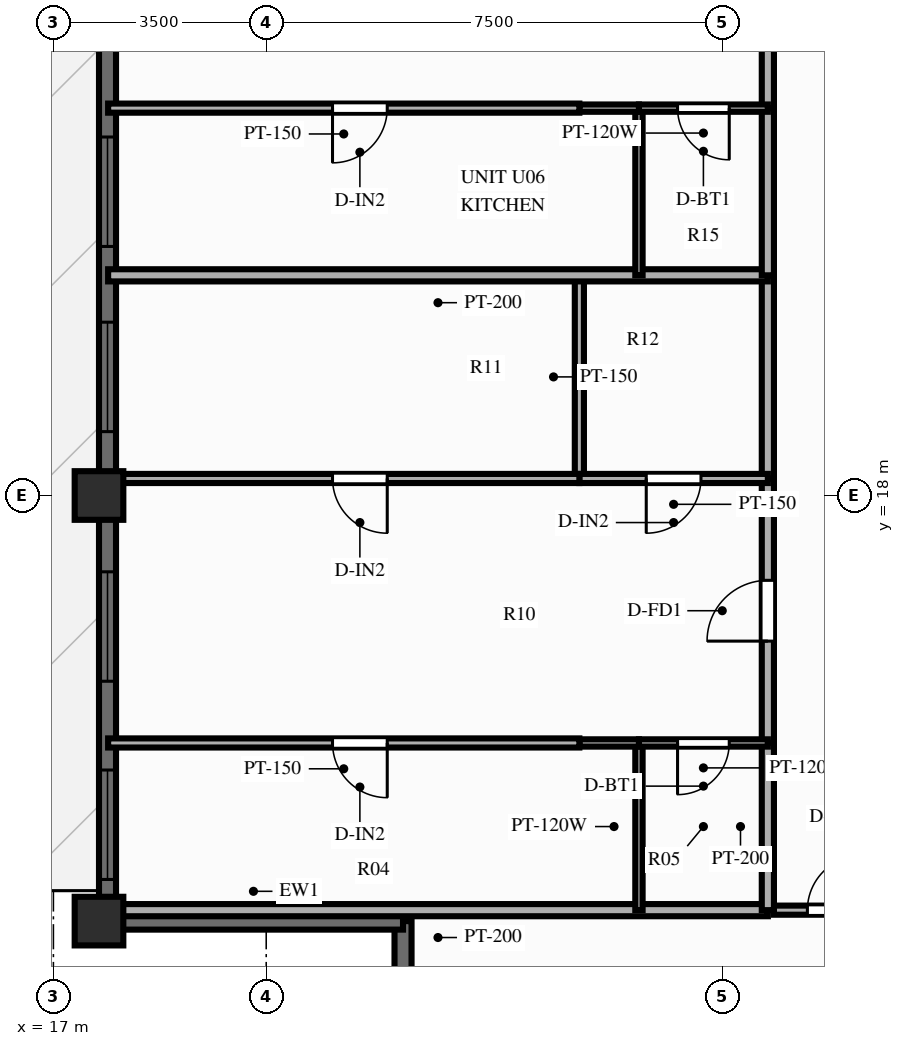
"""IFC4 building model, lengths in metres.
Left out: names, types, materials, properties, quantities, classifications, styles, units other than length and angle.
Written with IfcOpenShell. Run it as: python <this file> out.ifc"""

import sys

from ifc_helpers import new_model, si_unit, direction, frame, frame_2d, origin, origin_2d, place, context, subcontext, project, spatial, rectangle, extrude, source, transform, mapped, element, fill, save


model = new_model("IFC4")
c1 = context("Model", 3, precision=1e-05, world=origin(), true_north=direction((0.0, 1.0)))
c2 = subcontext(c1, "Body", "Model", "MODEL_VIEW")
j1 = project(units=[si_unit("LENGTHUNIT", "METRE"), si_unit("PLANEANGLEUNIT", "RADIAN")], contexts=[c1])
p1 = place(None, origin())
s1 = spatial("IfcSite", under=j1, at=p1, CompositionType="ELEMENT")
p2 = place(p1, origin())
s2 = spatial("IfcBuilding", under=s1, at=p2, CompositionType="ELEMENT")
p3 = place(p2, frame((0.0, 0.0, 172.9)))
s3 = spatial("IfcBuildingStorey", under=s2, at=p3, CompositionType="ELEMENT", Elevation=172.9)
m1 = source(origin(), c2, "Body", "SweptSolid", [
    extrude(rectangle(XDim=0.8, YDim=0.8, at=origin_2d()), origin(), (0.0, 0.0, 1.0), 3.9),
])
for number, where, z_axis, x_axis in (
    (1, (17.75, 18.0, 0.0), (0.0, 0.0, 1.0), (1.0, 0.0, 0.0)),
    (2, (17.75, 11.0, 0.0), (0.0, 0.0, 1.0), (1.0, 0.0, 0.0)),
):
    element("IfcColumn", number, at=place(p3, frame(where, z_axis=z_axis, x_axis=x_axis)), inside=s3, PredefinedType="COLUMN", context=c2, shape_type="MappedRepresentation", body=[
        mapped(m1, transform((0.0, 0.0, 0.0), scale=1.0)),
    ])
p4 = place(p3, frame((17.89, 11.0, 0.0), z_axis=(0.0, 0.0, 1.0), x_axis=(0.0, 1.0, 0.0)))
e3 = element("IfcWall", 3, at=p4, inside=s3, PredefinedType="SOLIDWALL", context=c2, shape_type="SweptSolid", body=[
    extrude(rectangle(XDim=32.0, YDim=0.28, at=frame_2d((16.0, 0.0))), origin(), (0.0, 0.0, 1.0), 2.79),
])
p5 = place(p4, frame((0.685, 0.0, 0.85)))
e4 = element("IfcOpeningElement", 4, at=p5, cuts=e3, PredefinedType="OPENING", context=c2, shape_type="SweptSolid", body=[
    extrude(rectangle(XDim=1.8, YDim=1.65, at=frame_2d((0.9, 0.825))), frame((0.0, 0.152, 0.0), z_axis=(0.0, -1.0, 0.0), x_axis=(1.0, 0.0, 0.0)), (0.0, 0.0, 1.0), 0.304),
])
p6 = place(p4, frame((3.945, 0.0, 0.85)))
e5 = element("IfcOpeningElement", 5, at=p6, cuts=e3, PredefinedType="OPENING", context=c2, shape_type="SweptSolid", body=[
    extrude(rectangle(XDim=1.8, YDim=1.65, at=frame_2d((0.9, 0.825))), frame((0.0, 0.152, 0.0), z_axis=(0.0, -1.0, 0.0), x_axis=(1.0, 0.0, 0.0)), (0.0, 0.0, 1.0), 0.304),
])
p7 = place(p4, frame((8.051, 0.0, 0.85)))
e6 = element("IfcOpeningElement", 6, at=p7, cuts=e3, PredefinedType="OPENING", context=c2, shape_type="SweptSolid", body=[
    extrude(rectangle(XDim=1.8, YDim=1.65, at=frame_2d((0.9, 0.825))), frame((0.0, 0.152, 0.0), z_axis=(0.0, -1.0, 0.0), x_axis=(1.0, 0.0, 0.0)), (0.0, 0.0, 1.0), 0.304),
])
p8 = place(p4, frame((11.096, 0.0, 0.85)))
e7 = element("IfcOpeningElement", 7, at=p8, cuts=e3, PredefinedType="OPENING", context=c2, shape_type="SweptSolid", body=[
    extrude(rectangle(XDim=1.8, YDim=1.65, at=frame_2d((0.9, 0.825))), frame((0.0, 0.152, 0.0), z_axis=(0.0, -1.0, 0.0), x_axis=(1.0, 0.0, 0.0)), (0.0, 0.0, 1.0), 0.304),
])
p9 = place(p4, frame((14.575, 0.0, 0.0)))
e8 = element("IfcOpeningElement", 8, at=p9, cuts=e3, PredefinedType="OPENING", context=c2, shape_type="SweptSolid", body=[
    extrude(rectangle(XDim=1.6, YDim=2.15, at=frame_2d((0.8, 1.075))), frame((0.0, 0.152, 0.0), z_axis=(0.0, -1.0, 0.0), x_axis=(1.0, 0.0, 0.0)), (0.0, 0.0, 1.0), 0.304),
])
p10 = place(p4, frame((18.479, 0.0, 0.85)))
e9 = element("IfcOpeningElement", 9, at=p10, cuts=e3, PredefinedType="OPENING", context=c2, shape_type="SweptSolid", body=[
    extrude(rectangle(XDim=1.8, YDim=1.65, at=frame_2d((0.9, 0.825))), frame((0.0, 0.152, 0.0), z_axis=(0.0, -1.0, 0.0), x_axis=(1.0, 0.0, 0.0)), (0.0, 0.0, 1.0), 0.304),
])
p11 = place(p4, frame((21.854, 0.0, 0.85)))
e10 = element("IfcOpeningElement", 10, at=p11, cuts=e3, PredefinedType="OPENING", context=c2, shape_type="SweptSolid", body=[
    extrude(rectangle(XDim=1.8, YDim=1.65, at=frame_2d((0.9, 0.825))), frame((0.0, 0.152, 0.0), z_axis=(0.0, -1.0, 0.0), x_axis=(1.0, 0.0, 0.0)), (0.0, 0.0, 1.0), 0.304),
])
p12 = place(p4, frame((25.796, 0.0, 0.85)))
e11 = element("IfcOpeningElement", 11, at=p12, cuts=e3, PredefinedType="OPENING", context=c2, shape_type="SweptSolid", body=[
    extrude(rectangle(XDim=1.5, YDim=1.65, at=frame_2d((0.75, 0.825))), frame((0.0, 0.152, 0.0), z_axis=(0.0, -1.0, 0.0), x_axis=(1.0, 0.0, 0.0)), (0.0, 0.0, 1.0), 0.304),
])
p13 = place(p4, frame((28.906, 0.0, 0.85)))
e12 = element("IfcOpeningElement", 12, at=p13, cuts=e3, PredefinedType="OPENING", context=c2, shape_type="SweptSolid", body=[
    extrude(rectangle(XDim=1.8, YDim=1.65, at=frame_2d((0.9, 0.825))), frame((0.0, 0.152, 0.0), z_axis=(0.0, -1.0, 0.0), x_axis=(1.0, 0.0, 0.0)), (0.0, 0.0, 1.0), 0.304),
])
for number, where, z_axis, x_axis in (
    (13, (22.75, 6.08, 0.0), (0.0, 0.0, 1.0), (0.0, 1.0, 0.0)),
    (14, (17.83, 11.0, 0.0), (0.0, 0.0, 1.0), (1.0, 0.0, 0.0)),
):
    element("IfcWall", number, at=place(p3, frame(where, z_axis=z_axis, x_axis=x_axis)), inside=s3, PredefinedType="SOLIDWALL", context=c2, shape_type="SweptSolid", body=[
        extrude(rectangle(XDim=4.92, YDim=0.28, at=frame_2d((2.46, 0.0))), origin(), (0.0, 0.0, 1.0), 2.79),
    ])
p14 = place(p3, frame((28.85, 11.18, 0.0), z_axis=(0.0, 0.0, 1.0), x_axis=(1.0, 0.0, 0.0)))
e15 = element("IfcWall", 15, at=p14, inside=s3, PredefinedType="PARTITIONING", context=c2, shape_type="SweptSolid", body=[
    extrude(rectangle(XDim=2.33, YDim=0.15, at=frame_2d((1.165, 0.0))), origin(), (0.0, 0.0, 1.0), 3.69),
])
p15 = place(p14, frame((0.55, 0.0, 0.0)))
e16 = element("IfcOpeningElement", 16, at=p15, cuts=e15, PredefinedType="OPENING", context=c2, shape_type="SweptSolid", body=[
    extrude(rectangle(XDim=0.9, YDim=2.1, at=frame_2d((0.45, 1.05))), frame((0.0, 0.087, 0.0), z_axis=(0.0, -1.0, 0.0), x_axis=(1.0, 0.0, 0.0)), (0.0, 0.0, 1.0), 0.174),
])
p16 = place(p3, frame((28.75, 11.18, 0.0), z_axis=(0.0, 0.0, 1.0), x_axis=(-1.0, 0.0, 0.0)))
e17 = element("IfcWall", 17, at=p16, inside=s3, PredefinedType="PARTITIONING", context=c2, shape_type="SweptSolid", body=[
    extrude(rectangle(XDim=10.85, YDim=0.2, at=frame_2d((5.425, 0.0))), origin(), (0.0, 0.0, 1.0), 3.69),
])
p17 = place(p3, frame((28.75, 11.18, 0.0), z_axis=(0.0, 0.0, 1.0), x_axis=(0.0, 1.0, 0.0)))
e18 = element("IfcWall", 18, at=p17, inside=s3, PredefinedType="PARTITIONING", context=c2, shape_type="SweptSolid", body=[
    extrude(rectangle(XDim=2.75, YDim=0.2, at=frame_2d((1.375, 0.0))), origin(), (0.0, 0.0, 1.0), 3.69),
])
p18 = place(p3, frame((28.75, 13.93, 0.0), z_axis=(0.0, 0.0, 1.0), x_axis=(0.0, 1.0, 0.0)))
e19 = element("IfcWall", 19, at=p18, inside=s3, PredefinedType="PARTITIONING", context=c2, shape_type="SweptSolid", body=[
    extrude(rectangle(XDim=4.35, YDim=0.2, at=frame_2d((2.175, 0.0))), origin(), (0.0, 0.0, 1.0), 3.69),
])
p19 = place(p18, frame((1.675, 0.0, 0.0)))
e20 = element("IfcOpeningElement", 20, at=p19, cuts=e19, PredefinedType="OPENING", context=c2, shape_type="SweptSolid", body=[
    extrude(rectangle(XDim=1.0, YDim=2.15, at=frame_2d((0.5, 1.075))), frame((0.0, 0.112, 0.0), z_axis=(0.0, -1.0, 0.0), x_axis=(1.0, 0.0, 0.0)), (0.0, 0.0, 1.0), 0.224),
])
p20 = place(p3, frame((28.75, 18.28, 0.0), z_axis=(0.0, 0.0, 1.0), x_axis=(0.0, 1.0, 0.0)))
e21 = element("IfcWall", 21, at=p20, inside=s3, PredefinedType="PARTITIONING", context=c2, shape_type="SweptSolid", body=[
    extrude(rectangle(XDim=3.341, YDim=0.2, at=frame_2d((1.67, 0.0))), origin(), (0.0, 0.0, 1.0), 3.69),
])
p21 = place(p3, frame((26.63, 11.18, 0.0), z_axis=(0.0, 0.0, 1.0), x_axis=(0.0, 1.0, 0.0)))
e22 = element("IfcWall", 22, at=p21, inside=s3, PredefinedType="PARTITIONING", context=c2, shape_type="SweptSolid", body=[
    extrude(rectangle(XDim=2.75, YDim=0.12, at=frame_2d((1.375, 0.0))), origin(), (0.0, 0.0, 1.0), 3.69),
])
p22 = place(p3, frame((25.65, 18.28, 0.0), z_axis=(0.0, 0.0, 1.0), x_axis=(0.0, 1.0, 0.0)))
e23 = element("IfcWall", 23, at=p22, inside=s3, PredefinedType="PARTITIONING", context=c2, shape_type="SweptSolid", body=[
    extrude(rectangle(XDim=3.341, YDim=0.15, at=frame_2d((1.67, 0.0))), origin(), (0.0, 0.0, 1.0), 3.69),
])
p23 = place(p3, frame((28.75, 13.93, 0.0), z_axis=(0.0, 0.0, 1.0), x_axis=(-1.0, 0.0, 0.0)))
e24 = element("IfcWall", 24, at=p23, inside=s3, PredefinedType="PARTITIONING", context=c2, shape_type="SweptSolid", body=[
    extrude(rectangle(XDim=2.12, YDim=0.12, at=frame_2d((1.06, 0.0))), origin(), (0.0, 0.0, 1.0), 3.69),
])
p24 = place(p23, frame((0.635, 0.0, 0.0)))
e25 = element("IfcOpeningElement", 25, at=p24, cuts=e24, PredefinedType="OPENING", context=c2, shape_type="SweptSolid", body=[
    extrude(rectangle(XDim=0.85, YDim=2.05, at=frame_2d((0.425, 1.025))), frame((0.0, 0.072, 0.0), z_axis=(0.0, -1.0, 0.0), x_axis=(1.0, 0.0, 0.0)), (0.0, 0.0, 1.0), 0.144),
])
p25 = place(p3, frame((26.63, 13.93, 0.0), z_axis=(0.0, 0.0, 1.0), x_axis=(-1.0, 0.0, 0.0)))
e26 = element("IfcWall", 26, at=p25, inside=s3, PredefinedType="PARTITIONING", context=c2, shape_type="SweptSolid", body=[
    extrude(rectangle(XDim=0.98, YDim=0.12, at=frame_2d((0.49, 0.0))), origin(), (0.0, 0.0, 1.0), 3.69),
])
p26 = place(p3, frame((25.65, 13.93, 0.0), z_axis=(0.0, 0.0, 1.0), x_axis=(-1.0, 0.0, 0.0)))
e27 = element("IfcWall", 27, at=p26, inside=s3, PredefinedType="PARTITIONING", context=c2, shape_type="SweptSolid", body=[
    extrude(rectangle(XDim=7.75, YDim=0.15, at=frame_2d((3.875, 0.0))), origin(), (0.0, 0.0, 1.0), 3.69),
])
p27 = place(p26, frame((3.16, 0.0, 0.0)))
e28 = element("IfcOpeningElement", 28, at=p27, cuts=e27, PredefinedType="OPENING", context=c2, shape_type="SweptSolid", body=[
    extrude(rectangle(XDim=0.9, YDim=2.1, at=frame_2d((0.45, 1.05))), frame((0.0, 0.087, 0.0), z_axis=(0.0, -1.0, 0.0), x_axis=(1.0, 0.0, 0.0)), (0.0, 0.0, 1.0), 0.174),
])
p28 = place(p3, frame((28.75, 18.28, 0.0), z_axis=(0.0, 0.0, 1.0), x_axis=(-1.0, 0.0, 0.0)))
e29 = element("IfcWall", 29, at=p28, inside=s3, PredefinedType="PARTITIONING", context=c2, shape_type="SweptSolid", body=[
    extrude(rectangle(XDim=3.1, YDim=0.15, at=frame_2d((1.55, 0.0))), origin(), (0.0, 0.0, 1.0), 3.69),
])
p29 = place(p28, frame((1.1, 0.0, 0.0)))
e30 = element("IfcOpeningElement", 30, at=p29, cuts=e29, PredefinedType="OPENING", context=c2, shape_type="SweptSolid", body=[
    extrude(rectangle(XDim=0.9, YDim=2.1, at=frame_2d((0.45, 1.05))), frame((0.0, 0.087, 0.0), z_axis=(0.0, -1.0, 0.0), x_axis=(1.0, 0.0, 0.0)), (0.0, 0.0, 1.0), 0.174),
])
p30 = place(p3, frame((25.65, 18.28, 0.0), z_axis=(0.0, 0.0, 1.0), x_axis=(-1.0, 0.0, 0.0)))
e31 = element("IfcWall", 31, at=p30, inside=s3, PredefinedType="PARTITIONING", context=c2, shape_type="SweptSolid", body=[
    extrude(rectangle(XDim=7.75, YDim=0.15, at=frame_2d((3.875, 0.0))), origin(), (0.0, 0.0, 1.0), 3.69),
])
p31 = place(p30, frame((3.16, 0.0, 0.0)))
e32 = element("IfcOpeningElement", 32, at=p31, cuts=e31, PredefinedType="OPENING", context=c2, shape_type="SweptSolid", body=[
    extrude(rectangle(XDim=0.9, YDim=2.1, at=frame_2d((0.45, 1.05))), frame((0.0, 0.087, 0.0), z_axis=(0.0, -1.0, 0.0), x_axis=(1.0, 0.0, 0.0)), (0.0, 0.0, 1.0), 0.174),
])
p32 = place(p3, frame((28.75, 21.621, 0.0), z_axis=(0.0, 0.0, 1.0), x_axis=(-1.0, 0.0, 0.0)))
e33 = element("IfcWall", 33, at=p32, inside=s3, PredefinedType="PARTITIONING", context=c2, shape_type="SweptSolid", body=[
    extrude(rectangle(XDim=10.85, YDim=0.2, at=frame_2d((5.425, 0.0))), origin(), (0.0, 0.0, 1.0), 3.29),
])
p33 = place(p3, frame((28.75, 21.621, 0.0), z_axis=(0.0, 0.0, 1.0), x_axis=(0.0, 1.0, 0.0)))
e34 = element("IfcWall", 34, at=p33, inside=s3, PredefinedType="PARTITIONING", context=c2, shape_type="SweptSolid", body=[
    extrude(rectangle(XDim=2.75, YDim=0.2, at=frame_2d((1.375, 0.0))), origin(), (0.0, 0.0, 1.0), 3.69),
])
p34 = place(p3, frame((28.75, 24.371, 0.0), z_axis=(0.0, 0.0, 1.0), x_axis=(0.0, 1.0, 0.0)))
e35 = element("IfcWall", 35, at=p34, inside=s3, PredefinedType="PARTITIONING", context=c2, shape_type="SweptSolid", body=[
    extrude(rectangle(XDim=4.008, YDim=0.2, at=frame_2d((2.004, 0.0))), origin(), (0.0, 0.0, 1.0), 3.69),
])
p35 = place(p34, frame((1.504, 0.0, 0.0)))
e36 = element("IfcOpeningElement", 36, at=p35, cuts=e35, PredefinedType="OPENING", context=c2, shape_type="SweptSolid", body=[
    extrude(rectangle(XDim=1.0, YDim=2.15, at=frame_2d((0.5, 1.075))), frame((0.0, 0.112, 0.0), z_axis=(0.0, -1.0, 0.0), x_axis=(1.0, 0.0, 0.0)), (0.0, 0.0, 1.0), 0.224),
])
p36 = place(p3, frame((26.63, 21.621, 0.0), z_axis=(0.0, 0.0, 1.0), x_axis=(0.0, 1.0, 0.0)))
e37 = element("IfcWall", 37, at=p36, inside=s3, PredefinedType="PARTITIONING", context=c2, shape_type="SweptSolid", body=[
    extrude(rectangle(XDim=2.75, YDim=0.12, at=frame_2d((1.375, 0.0))), origin(), (0.0, 0.0, 1.0), 3.69),
])
p37 = place(p3, frame((28.75, 24.371, 0.0), z_axis=(0.0, 0.0, 1.0), x_axis=(-1.0, 0.0, 0.0)))
e38 = element("IfcWall", 38, at=p37, inside=s3, PredefinedType="PARTITIONING", context=c2, shape_type="SweptSolid", body=[
    extrude(rectangle(XDim=2.12, YDim=0.12, at=frame_2d((1.06, 0.0))), origin(), (0.0, 0.0, 1.0), 3.69),
])
p38 = place(p37, frame((0.635, 0.0, 0.0)))
e39 = element("IfcOpeningElement", 39, at=p38, cuts=e38, PredefinedType="OPENING", context=c2, shape_type="SweptSolid", body=[
    extrude(rectangle(XDim=0.85, YDim=2.05, at=frame_2d((0.425, 1.025))), frame((0.0, 0.072, 0.0), z_axis=(0.0, -1.0, 0.0), x_axis=(1.0, 0.0, 0.0)), (0.0, 0.0, 1.0), 0.144),
])
p39 = place(p3, frame((26.63, 24.371, 0.0), z_axis=(0.0, 0.0, 1.0), x_axis=(-1.0, 0.0, 0.0)))
e40 = element("IfcWall", 40, at=p39, inside=s3, PredefinedType="PARTITIONING", context=c2, shape_type="SweptSolid", body=[
    extrude(rectangle(XDim=0.98, YDim=0.12, at=frame_2d((0.49, 0.0))), origin(), (0.0, 0.0, 1.0), 3.69),
])
p40 = place(p3, frame((25.65, 24.371, 0.0), z_axis=(0.0, 0.0, 1.0), x_axis=(-1.0, 0.0, 0.0)))
e41 = element("IfcWall", 41, at=p40, inside=s3, PredefinedType="PARTITIONING", context=c2, shape_type="SweptSolid", body=[
    extrude(rectangle(XDim=7.75, YDim=0.15, at=frame_2d((3.875, 0.0))), origin(), (0.0, 0.0, 1.0), 3.69),
])
p41 = place(p40, frame((3.16, 0.0, 0.0)))
e42 = element("IfcOpeningElement", 42, at=p41, cuts=e41, PredefinedType="OPENING", context=c2, shape_type="SweptSolid", body=[
    extrude(rectangle(XDim=0.9, YDim=2.1, at=frame_2d((0.45, 1.05))), frame((0.0, 0.087, 0.0), z_axis=(0.0, -1.0, 0.0), x_axis=(1.0, 0.0, 0.0)), (0.0, 0.0, 1.0), 0.174),
])
m2 = source(origin(), c2, "Body", "SweptSolid", [
    extrude(rectangle(XDim=1.8, YDim=1.65, at=frame_2d((0.9, 0.825))), frame((0.0, 0.03, 0.0), z_axis=(0.0, -1.0, 0.0), x_axis=(1.0, 0.0, 0.0)), (0.0, 0.0, 1.0), 0.06),
])
p42 = place(p5, origin())
e43 = element("IfcWindow", 43, at=p42, inside=s3, PartitioningType="SINGLE_PANEL", PredefinedType="WINDOW", context=c2, shape_type="MappedRepresentation", body=[
    mapped(m2, transform((0.0, 0.0, 0.0), scale=1.0)),
])
fill(e4, e43)
p43 = place(p6, origin())
e44 = element("IfcWindow", 44, at=p43, inside=s3, PartitioningType="SINGLE_PANEL", PredefinedType="WINDOW", context=c2, shape_type="MappedRepresentation", body=[
    mapped(m2, transform((0.0, 0.0, 0.0), scale=1.0)),
])
fill(e5, e44)
p44 = place(p7, origin())
e45 = element("IfcWindow", 45, at=p44, inside=s3, PartitioningType="SINGLE_PANEL", PredefinedType="WINDOW", context=c2, shape_type="MappedRepresentation", body=[
    mapped(m2, transform((0.0, 0.0, 0.0), scale=1.0)),
])
fill(e6, e45)
p45 = place(p8, origin())
e46 = element("IfcWindow", 46, at=p45, inside=s3, PartitioningType="SINGLE_PANEL", PredefinedType="WINDOW", context=c2, shape_type="MappedRepresentation", body=[
    mapped(m2, transform((0.0, 0.0, 0.0), scale=1.0)),
])
fill(e7, e46)
m3 = source(origin(), c2, "Body", "SweptSolid", [
    extrude(rectangle(XDim=0.9, YDim=2.1, at=frame_2d((0.45, 1.05))), frame((0.0, 0.025, 0.0), z_axis=(0.0, -1.0, 0.0), x_axis=(1.0, 0.0, 0.0)), (0.0, 0.0, 1.0), 0.05),
])
p46 = place(p15, origin())
e47 = element("IfcDoor", 47, at=p46, inside=s3, OperationType="SINGLE_SWING_RIGHT", PredefinedType="DOOR", context=c2, shape_type="MappedRepresentation", body=[
    mapped(m3, transform((0.0, 0.0, 0.0), scale=1.0)),
])
fill(e16, e47)
m4 = source(origin(), c2, "Body", "SweptSolid", [
    extrude(rectangle(XDim=1.0, YDim=2.15, at=frame_2d((0.5, 1.075))), frame((0.0, 0.025, 0.0), z_axis=(0.0, -1.0, 0.0), x_axis=(1.0, 0.0, 0.0)), (0.0, 0.0, 1.0), 0.05),
])
p47 = place(p19, origin())
e48 = element("IfcDoor", 48, at=p47, inside=s3, OperationType="SINGLE_SWING_LEFT", PredefinedType="DOOR", context=c2, shape_type="MappedRepresentation", body=[
    mapped(m4, transform((0.0, 0.0, 0.0), scale=1.0)),
])
fill(e20, e48)
m5 = source(origin(), c2, "Body", "SweptSolid", [
    extrude(rectangle(XDim=0.85, YDim=2.05, at=frame_2d((0.425, 1.025))), frame((0.0, 0.025, 0.0), z_axis=(0.0, -1.0, 0.0), x_axis=(1.0, 0.0, 0.0)), (0.0, 0.0, 1.0), 0.05),
])
p48 = place(p24, origin())
e49 = element("IfcDoor", 49, at=p48, inside=s3, OperationType="SINGLE_SWING_RIGHT", PredefinedType="DOOR", context=c2, shape_type="MappedRepresentation", body=[
    mapped(m5, transform((0.0, 0.0, 0.0), scale=1.0)),
])
fill(e25, e49)
p49 = place(p27, origin())
e50 = element("IfcDoor", 50, at=p49, inside=s3, OperationType="SINGLE_SWING_LEFT", PredefinedType="DOOR", context=c2, shape_type="MappedRepresentation", body=[
    mapped(m3, transform((0.0, 0.0, 0.0), scale=1.0)),
])
fill(e28, e50)
p50 = place(p29, origin())
e51 = element("IfcDoor", 51, at=p50, inside=s3, OperationType="SINGLE_SWING_RIGHT", PredefinedType="DOOR", context=c2, shape_type="MappedRepresentation", body=[
    mapped(m3, transform((0.0, 0.0, 0.0), scale=1.0)),
])
fill(e30, e51)
p51 = place(p31, origin())
e52 = element("IfcDoor", 52, at=p51, inside=s3, OperationType="SINGLE_SWING_LEFT", PredefinedType="DOOR", context=c2, shape_type="MappedRepresentation", body=[
    mapped(m3, transform((0.0, 0.0, 0.0), scale=1.0)),
])
fill(e32, e52)
p52 = place(p38, origin())
e53 = element("IfcDoor", 53, at=p52, inside=s3, OperationType="SINGLE_SWING_LEFT", PredefinedType="DOOR", context=c2, shape_type="MappedRepresentation", body=[
    mapped(m5, transform((0.0, 0.0, 0.0), scale=1.0)),
])
fill(e39, e53)
p53 = place(p41, origin())
e54 = element("IfcDoor", 54, at=p53, inside=s3, OperationType="SINGLE_SWING_RIGHT", PredefinedType="DOOR", context=c2, shape_type="MappedRepresentation", body=[
    mapped(m3, transform((0.0, 0.0, 0.0), scale=1.0)),
])
fill(e42, e54)
save(model, sys.argv[1])
